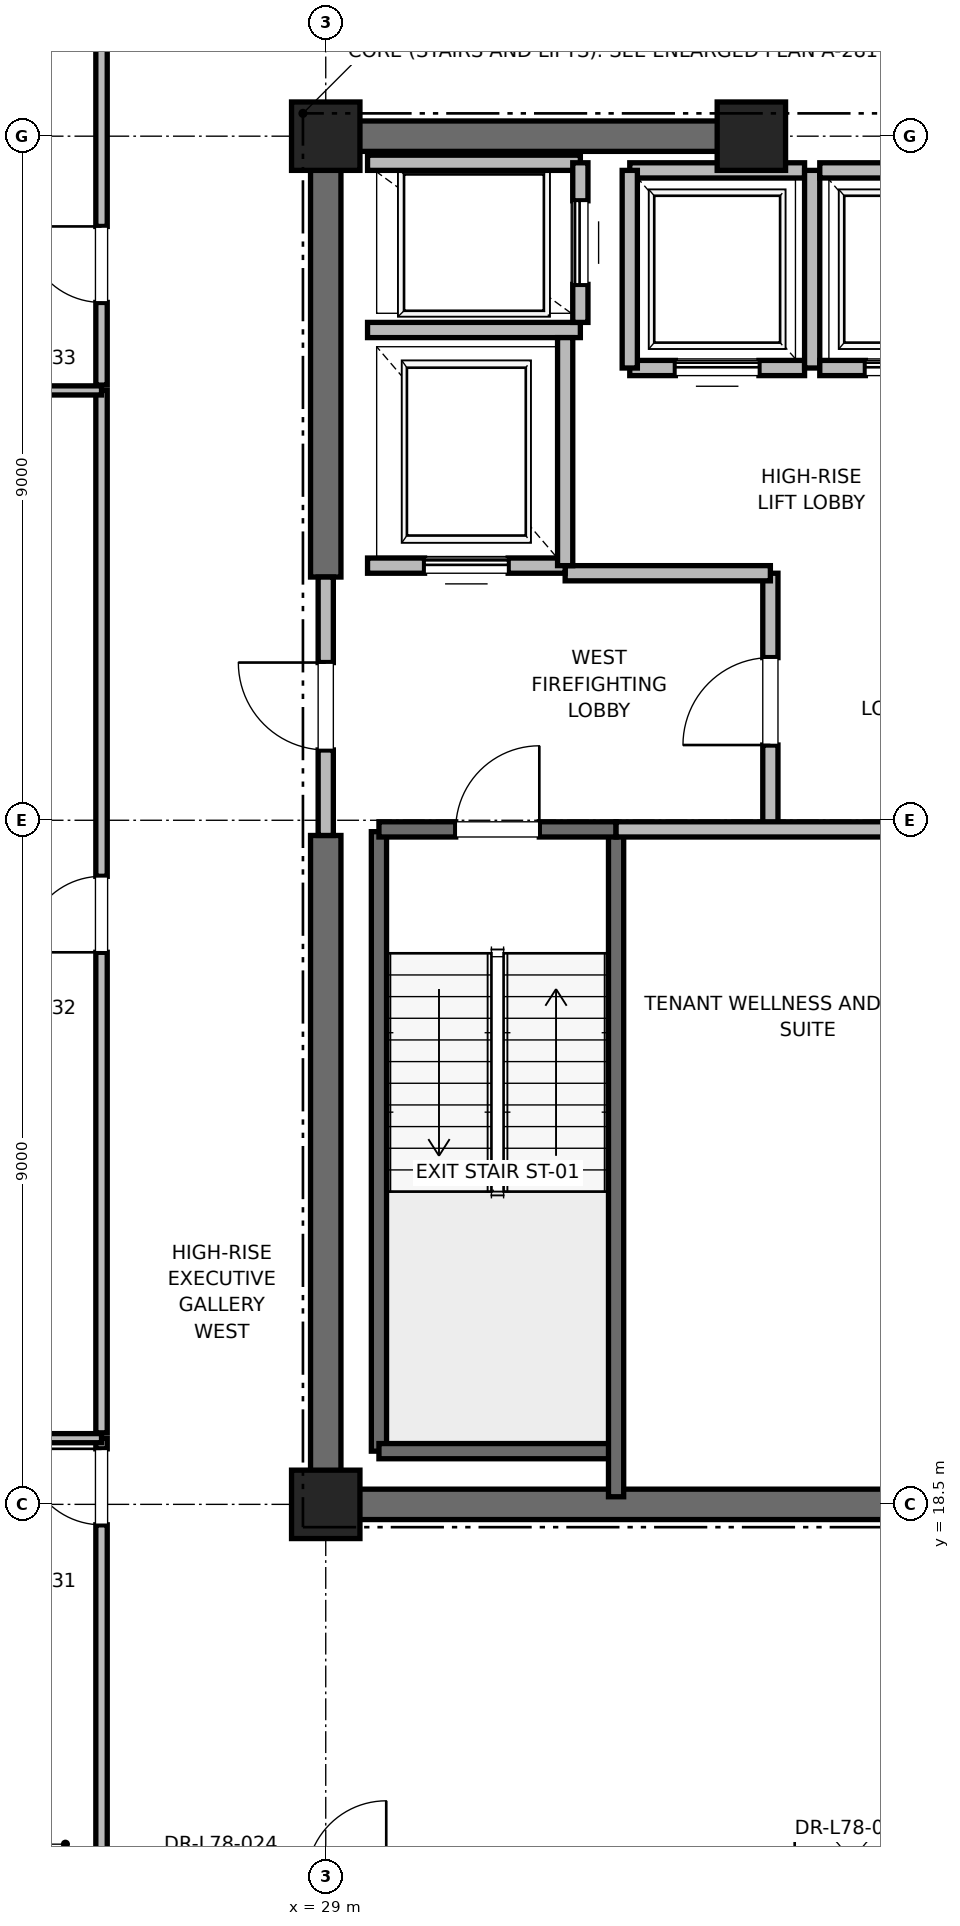
"""IFC4 building model, lengths in metres.
Left out: names, types, materials, properties, quantities, classifications, styles, units other than length and angle.
Written with IfcOpenShell. Run it as: python <this file> out.ifc"""

import sys

from ifc_helpers import new_model, si_unit, direction, frame, frame_2d, origin, origin_2d, place, context, subcontext, project, spatial, rectangle, extrude, element, fill, save


model = new_model("IFC4")
c1 = context("Model", 3, precision=1e-05, world=origin(), true_north=direction((0.0, 1.0)))
c2 = subcontext(c1, "Body", "Model", "MODEL_VIEW")
j1 = project(units=[si_unit("LENGTHUNIT", "METRE"), si_unit("PLANEANGLEUNIT", "RADIAN")], contexts=[c1])
p1 = place(None, origin())
s1 = spatial("IfcSite", under=j1, at=p1, CompositionType="ELEMENT")
p2 = place(p1, origin())
s2 = spatial("IfcBuilding", under=s1, at=p2, CompositionType="ELEMENT")
p3 = place(p2, frame((0.0, 0.0, 334.8)))
s3 = spatial("IfcBuildingStorey", under=s2, at=p3, CompositionType="ELEMENT", Elevation=334.8)
for number, where, z_axis, x_axis in (
    (1, (29.0, 18.5, 0.0), (0.0, 0.0, 1.0), (1.0, 0.0, 0.0)),
    (2, (29.0, 36.5, 0.0), (0.0, 0.0, 1.0), (1.0, 0.0, 0.0)),
    (3, (34.6, 36.5, 0.0), (0.0, 0.0, 1.0), (1.0, 0.0, 0.0)),
):
    element("IfcColumn", number, at=place(p3, frame(where, z_axis=z_axis, x_axis=x_axis)), inside=s3, PredefinedType="PILASTER", context=c2, shape_type="SweptSolid", body=[
        extrude(rectangle(XDim=0.9, YDim=0.9, at=origin_2d()), origin(), (0.0, 0.0, 1.0), 4.0),
    ])
p4 = place(p3, frame((29.0, 18.5, 0.0), z_axis=(0.0, 0.0, 1.0), x_axis=(1.0, 0.0, 0.0)))
e4 = element("IfcWall", 4, at=p4, inside=s3, PredefinedType="SHEAR", context=c2, shape_type="SweptSolid", body=[
    extrude(rectangle(XDim=9.2, YDim=0.4, at=frame_2d((4.6, 0.0))), origin(), (0.0, 0.0, 1.0), 3.785),
])
p5 = place(p3, frame((29.0, 36.5, 0.0), z_axis=(0.0, 0.0, 1.0), x_axis=(1.0, 0.0, 0.0)))
e5 = element("IfcWall", 5, at=p5, inside=s3, PredefinedType="SHEAR", context=c2, shape_type="SweptSolid", body=[
    extrude(rectangle(XDim=5.8, YDim=0.4, at=frame_2d((2.9, 0.0))), origin(), (0.0, 0.0, 1.0), 3.785),
])
p6 = place(p3, frame((29.0, 18.5, 0.0), z_axis=(0.0, 0.0, 1.0), x_axis=(0.0, 1.0, 0.0)))
e6 = element("IfcWall", 6, at=p6, inside=s3, PredefinedType="SHEAR", context=c2, shape_type="SweptSolid", body=[
    extrude(rectangle(XDim=8.8, YDim=0.4, at=frame_2d((4.4, 0.0))), origin(), (0.0, 0.0, 1.0), 3.785),
])
p7 = place(p3, frame((29.0, 30.7, 0.0), z_axis=(0.0, 0.0, 1.0), x_axis=(0.0, 1.0, 0.0)))
e7 = element("IfcWall", 7, at=p7, inside=s3, PredefinedType="SHEAR", context=c2, shape_type="SweptSolid", body=[
    extrude(rectangle(XDim=5.8, YDim=0.4, at=frame_2d((2.9, 0.0))), origin(), (0.0, 0.0, 1.0), 3.785),
])
p8 = place(p3, frame((29.7, 19.2, 0.0), z_axis=(0.0, 0.0, 1.0), x_axis=(0.0, 1.0, 0.0)))
e8 = element("IfcWall", 8, at=p8, inside=s3, PredefinedType="SOLIDWALL", context=c2, shape_type="SweptSolid", body=[
    extrude(rectangle(XDim=8.15, YDim=0.2, at=frame_2d((4.075, 0.0))), origin(), (0.0, 0.0, 1.0), 3.785),
])
p9 = place(p3, frame((29.7, 19.2, 0.0), z_axis=(0.0, 0.0, 1.0), x_axis=(1.0, 0.0, 0.0)))
e9 = element("IfcWall", 9, at=p9, inside=s3, PredefinedType="SOLIDWALL", context=c2, shape_type="SweptSolid", body=[
    extrude(rectangle(XDim=3.12, YDim=0.2, at=frame_2d((1.56, 0.0))), origin(), (0.0, 0.0, 1.0), 3.785),
])
p10 = place(p3, frame((32.82, 18.6, 0.0), z_axis=(0.0, 0.0, 1.0), x_axis=(0.0, 1.0, 0.0)))
e10 = element("IfcWall", 10, at=p10, inside=s3, PredefinedType="SOLIDWALL", context=c2, shape_type="SweptSolid", body=[
    extrude(rectangle(XDim=8.78, YDim=0.2, at=frame_2d((4.39, 0.0))), origin(), (0.0, 0.0, 1.0), 3.785),
])
p11 = place(p3, frame((29.7, 27.38, 0.0), z_axis=(0.0, 0.0, 1.0), x_axis=(1.0, 0.0, 0.0)))
e11 = element("IfcWall", 11, at=p11, inside=s3, PredefinedType="SOLIDWALL", context=c2, shape_type="SweptSolid", body=[
    extrude(rectangle(XDim=3.12, YDim=0.2, at=frame_2d((1.56, 0.0))), origin(), (0.0, 0.0, 1.0), 3.785),
])
p12 = place(p11, frame((1.01, 0.0, 0.0)))
e12 = element("IfcOpeningElement", 12, at=p12, cuts=e11, PredefinedType="OPENING", context=c2, shape_type="SweptSolid", body=[
    extrude(rectangle(XDim=1.1, YDim=2.15, at=frame_2d((0.55, 1.075))), frame((0.0, 0.1, 0.0), z_axis=(0.0, -1.0, 0.0), x_axis=(1.0, 0.0, 0.0)), (0.0, 0.0, 1.0), 0.2),
])
p13 = place(p3, frame((34.85, 27.38, 0.0), z_axis=(0.0, 0.0, 1.0), x_axis=(0.0, 1.0, 0.0)))
e13 = element("IfcWall", 13, at=p13, inside=s3, PredefinedType="PARTITIONING", context=c2, shape_type="SweptSolid", body=[
    extrude(rectangle(XDim=3.37, YDim=0.2, at=frame_2d((1.685, 0.0))), origin(), (0.0, 0.0, 1.0), 3.785),
])
p14 = place(p13, frame((1.11, 0.0, 0.0)))
e14 = element("IfcOpeningElement", 14, at=p14, cuts=e13, PredefinedType="OPENING", context=c2, shape_type="SweptSolid", body=[
    extrude(rectangle(XDim=1.15, YDim=2.2, at=frame_2d((0.575, 1.1))), frame((0.0, 0.1, 0.0), z_axis=(0.0, -1.0, 0.0), x_axis=(1.0, 0.0, 0.0)), (0.0, 0.0, 1.0), 0.2),
])
p15 = place(p3, frame((29.0, 27.3, 0.0), z_axis=(0.0, 0.0, 1.0), x_axis=(0.0, 1.0, 0.0)))
e15 = element("IfcWall", 15, at=p15, inside=s3, PredefinedType="PARTITIONING", context=c2, shape_type="SweptSolid", body=[
    extrude(rectangle(XDim=3.4, YDim=0.2, at=frame_2d((1.7, 0.0))), origin(), (0.0, 0.0, 1.0), 2.865),
])
p16 = place(p15, frame((1.125, 0.0, 0.0)))
e16 = element("IfcOpeningElement", 16, at=p16, cuts=e15, PredefinedType="OPENING", context=c2, shape_type="SweptSolid", body=[
    extrude(rectangle(XDim=1.15, YDim=2.2, at=frame_2d((0.575, 1.1))), frame((0.0, 0.1, 0.0), z_axis=(0.0, -1.0, 0.0), x_axis=(1.0, 0.0, 0.0)), (0.0, 0.0, 1.0), 0.2),
])
p17 = place(p3, frame((32.82, 27.38, 0.0), z_axis=(0.0, 0.0, 1.0), x_axis=(1.0, 0.0, 0.0)))
e17 = element("IfcWall", 17, at=p17, inside=s3, PredefinedType="PARTITIONING", context=c2, shape_type="SweptSolid", body=[
    extrude(rectangle(XDim=5.62, YDim=0.2, at=frame_2d((2.81, 0.0))), origin(), (0.0, 0.0, 1.0), 3.785),
])
p18 = place(p3, frame((32.15, 30.75, 0.0), z_axis=(0.0, 0.0, 1.0), x_axis=(1.0, 0.0, 0.0)))
e18 = element("IfcWall", 18, at=p18, inside=s3, PredefinedType="PARTITIONING", context=c2, shape_type="SweptSolid", body=[
    extrude(rectangle(XDim=2.7, YDim=0.2, at=frame_2d((1.35, 0.0))), origin(), (0.0, 0.0, 1.0), 3.785),
])
p19 = place(p3, frame((29.55, 30.85, 0.0), z_axis=(0.0, 0.0, 1.0), x_axis=(1.0, 0.0, 0.0)))
e19 = element("IfcWall", 19, at=p19, inside=s3, PredefinedType="SOLIDWALL", context=c2, shape_type="SweptSolid", body=[
    extrude(rectangle(XDim=2.6, YDim=0.2, at=frame_2d((1.3, 0.0))), origin(), (0.0, 0.0, 1.0), 2.865),
])
p20 = place(p19, frame((0.75, 0.0, 0.0)))
e20 = element("IfcOpeningElement", 20, at=p20, cuts=e19, PredefinedType="OPENING", context=c2, shape_type="SweptSolid", body=[
    extrude(rectangle(XDim=1.1, YDim=2.2, at=frame_2d((0.55, 1.1))), frame((0.0, 0.1, 0.0), z_axis=(0.0, -1.0, 0.0), x_axis=(1.0, 0.0, 0.0)), (0.0, 0.0, 1.0), 0.2),
])
p21 = place(p3, frame((29.55, 33.95, 0.0), z_axis=(0.0, 0.0, 1.0), x_axis=(1.0, 0.0, 0.0)))
e21 = element("IfcWall", 21, at=p21, inside=s3, PredefinedType="SOLIDWALL", context=c2, shape_type="SweptSolid", body=[
    extrude(rectangle(XDim=2.8, YDim=0.2, at=frame_2d((1.4, 0.0))), origin(), (0.0, 0.0, 1.0), 3.785),
])
p22 = place(p3, frame((32.15, 30.85, 0.0), z_axis=(0.0, 0.0, 1.0), x_axis=(0.0, 1.0, 0.0)))
e22 = element("IfcWall", 22, at=p22, inside=s3, PredefinedType="SOLIDWALL", context=c2, shape_type="SweptSolid", body=[
    extrude(rectangle(XDim=3.0, YDim=0.2, at=frame_2d((1.5, 0.0))), origin(), (0.0, 0.0, 1.0), 3.785),
])
p23 = place(p3, frame((32.35, 36.15, 0.0), z_axis=(0.0, 0.0, 1.0), x_axis=(-1.0, 0.0, 0.0)))
e23 = element("IfcWall", 23, at=p23, inside=s3, PredefinedType="SOLIDWALL", context=c2, shape_type="SweptSolid", body=[
    extrude(rectangle(XDim=2.8, YDim=0.2, at=frame_2d((1.4, 0.0))), origin(), (0.0, 0.0, 1.0), 3.22),
])
p24 = place(p3, frame((32.35, 34.05, 0.0), z_axis=(0.0, 0.0, 1.0), x_axis=(0.0, 1.0, 0.0)))
e24 = element("IfcWall", 24, at=p24, inside=s3, PredefinedType="SOLIDWALL", context=c2, shape_type="SweptSolid", body=[
    extrude(rectangle(XDim=2.1, YDim=0.2, at=frame_2d((1.05, 0.0))), origin(), (0.0, 0.0, 1.0), 3.785),
])
p25 = place(p24, frame((0.5, 0.0, 0.0)))
e25 = element("IfcOpeningElement", 25, at=p25, cuts=e24, PredefinedType="OPENING", context=c2, shape_type="SweptSolid", body=[
    extrude(rectangle(XDim=1.1, YDim=2.2, at=frame_2d((0.55, 1.1))), frame((0.0, 0.1, 0.0), z_axis=(0.0, -1.0, 0.0), x_axis=(1.0, 0.0, 0.0)), (0.0, 0.0, 1.0), 0.2),
])
p26 = place(p3, frame((33.0, 33.45, 0.0), z_axis=(0.0, 0.0, 1.0), x_axis=(1.0, 0.0, 0.0)))
e26 = element("IfcWall", 26, at=p26, inside=s3, PredefinedType="SOLIDWALL", context=c2, shape_type="SweptSolid", body=[
    extrude(rectangle(XDim=2.3, YDim=0.2, at=frame_2d((1.15, 0.0))), origin(), (0.0, 0.0, 1.0), 3.785),
])
p27 = place(p26, frame((0.6, 0.0, 0.0)))
e27 = element("IfcOpeningElement", 27, at=p27, cuts=e26, PredefinedType="OPENING", context=c2, shape_type="SweptSolid", body=[
    extrude(rectangle(XDim=1.1, YDim=2.2, at=frame_2d((0.55, 1.1))), frame((0.0, 0.1, 0.0), z_axis=(0.0, -1.0, 0.0), x_axis=(1.0, 0.0, 0.0)), (0.0, 0.0, 1.0), 0.2),
])
p28 = place(p3, frame((35.3, 36.05, 0.0), z_axis=(0.0, 0.0, 1.0), x_axis=(-1.0, 0.0, 0.0)))
e28 = element("IfcWall", 28, at=p28, inside=s3, PredefinedType="SOLIDWALL", context=c2, shape_type="SweptSolid", body=[
    extrude(rectangle(XDim=2.3, YDim=0.2, at=frame_2d((1.15, 0.0))), origin(), (0.0, 0.0, 1.0), 2.865),
])
p29 = place(p3, frame((33.0, 36.05, 0.0), z_axis=(0.0, 0.0, 1.0), x_axis=(0.0, -1.0, 0.0)))
e29 = element("IfcWall", 29, at=p29, inside=s3, PredefinedType="SOLIDWALL", context=c2, shape_type="SweptSolid", body=[
    extrude(rectangle(XDim=2.6, YDim=0.2, at=frame_2d((1.3, 0.0))), origin(), (0.0, 0.0, 1.0), 3.785),
])
p30 = place(p3, frame((35.4, 33.45, 0.0), z_axis=(0.0, 0.0, 1.0), x_axis=(0.0, 1.0, 0.0)))
e30 = element("IfcWall", 30, at=p30, inside=s3, PredefinedType="SOLIDWALL", context=c2, shape_type="SweptSolid", body=[
    extrude(rectangle(XDim=2.6, YDim=0.2, at=frame_2d((1.3, 0.0))), origin(), (0.0, 0.0, 1.0), 2.865),
])
p31 = place(p3, frame((35.5, 33.45, 0.0), z_axis=(0.0, 0.0, 1.0), x_axis=(1.0, 0.0, 0.0)))
e31 = element("IfcWall", 31, at=p31, inside=s3, PredefinedType="SOLIDWALL", context=c2, shape_type="SweptSolid", body=[
    extrude(rectangle(XDim=2.3, YDim=0.2, at=frame_2d((1.15, 0.0))), origin(), (0.0, 0.0, 1.0), 3.785),
])
p32 = place(p31, frame((0.6, 0.0, 0.0)))
e32 = element("IfcOpeningElement", 32, at=p32, cuts=e31, PredefinedType="OPENING", context=c2, shape_type="SweptSolid", body=[
    extrude(rectangle(XDim=1.1, YDim=2.2, at=frame_2d((0.55, 1.1))), frame((0.0, 0.1, 0.0), z_axis=(0.0, -1.0, 0.0), x_axis=(1.0, 0.0, 0.0)), (0.0, 0.0, 1.0), 0.2),
])
p33 = place(p3, frame((37.8, 36.05, 0.0), z_axis=(0.0, 0.0, 1.0), x_axis=(-1.0, 0.0, 0.0)))
e33 = element("IfcWall", 33, at=p33, inside=s3, PredefinedType="SOLIDWALL", context=c2, shape_type="SweptSolid", body=[
    extrude(rectangle(XDim=2.3, YDim=0.2, at=frame_2d((1.15, 0.0))), origin(), (0.0, 0.0, 1.0), 2.865),
])
p34 = place(p3, frame((26.05, 9.828, 0.0), z_axis=(0.0, 0.0, 1.0), x_axis=(0.0, 1.0, 0.0)))
e34 = element("IfcWall", 34, at=p34, inside=s3, PredefinedType="PARTITIONING", context=c2, shape_type="SweptSolid", body=[
    extrude(rectangle(XDim=9.543, YDim=0.15, at=frame_2d((4.771, 0.0))), origin(), (0.0, 0.0, 1.0), 2.85),
])
p35 = place(p34, frame((8.403, 0.0, 0.0)))
e35 = element("IfcOpeningElement", 35, at=p35, cuts=e34, PredefinedType="OPENING", context=c2, shape_type="SweptSolid", body=[
    extrude(rectangle(XDim=1.0, YDim=2.15, at=frame_2d((0.5, 1.075))), frame((0.0, 0.075, 0.0), z_axis=(0.0, -1.0, 0.0), x_axis=(1.0, 0.0, 0.0)), (0.0, 0.0, 1.0), 0.15),
])
p36 = place(p3, frame((15.756, 19.371, 0.0), z_axis=(0.0, 0.0, 1.0), x_axis=(1.0, 0.0, 0.0)))
e36 = element("IfcWall", 36, at=p36, inside=s3, PredefinedType="PARTITIONING", context=c2, shape_type="SweptSolid", body=[
    extrude(rectangle(XDim=10.294, YDim=0.12, at=frame_2d((5.147, 0.0))), origin(), (0.0, 0.0, 1.0), 2.85),
])
p37 = place(p3, frame((26.05, 19.441, 0.0), z_axis=(0.0, 0.0, 1.0), x_axis=(0.0, 1.0, 0.0)))
e37 = element("IfcWall", 37, at=p37, inside=s3, PredefinedType="PARTITIONING", context=c2, shape_type="SweptSolid", body=[
    extrude(rectangle(XDim=13.714, YDim=0.15, at=frame_2d((6.857, 0.0))), origin(), (0.0, 0.0, 1.0), 2.85),
])
p38 = place(p37, frame((6.322, 0.0, 0.0)))
e38 = element("IfcOpeningElement", 38, at=p38, cuts=e37, PredefinedType="OPENING", context=c2, shape_type="SweptSolid", body=[
    extrude(rectangle(XDim=1.0, YDim=2.15, at=frame_2d((0.5, 1.075))), frame((0.0, 0.075, 0.0), z_axis=(0.0, -1.0, 0.0), x_axis=(1.0, 0.0, 0.0)), (0.0, 0.0, 1.0), 0.15),
])
p39 = place(p3, frame((15.756, 33.155, 0.0), z_axis=(0.0, 0.0, 1.0), x_axis=(1.0, 0.0, 0.0)))
e39 = element("IfcWall", 39, at=p39, inside=s3, PredefinedType="PARTITIONING", context=c2, shape_type="SweptSolid", body=[
    extrude(rectangle(XDim=10.294, YDim=0.12, at=frame_2d((5.147, 0.0))), origin(), (0.0, 0.0, 1.0), 2.85),
])
p40 = place(p3, frame((26.05, 33.225, 0.0), z_axis=(0.0, 0.0, 1.0), x_axis=(0.0, 1.0, 0.0)))
e40 = element("IfcWall", 40, at=p40, inside=s3, PredefinedType="PARTITIONING", context=c2, shape_type="SweptSolid", body=[
    extrude(rectangle(XDim=11.947, YDim=0.15, at=frame_2d((5.974, 0.0))), origin(), (0.0, 0.0, 1.0), 2.85),
])
p41 = place(p40, frame((1.087, 0.0, 0.0)))
e41 = element("IfcOpeningElement", 41, at=p41, cuts=e40, PredefinedType="OPENING", context=c2, shape_type="SweptSolid", body=[
    extrude(rectangle(XDim=1.0, YDim=2.15, at=frame_2d((0.5, 1.075))), frame((0.0, 0.075, 0.0), z_axis=(0.0, -1.0, 0.0), x_axis=(1.0, 0.0, 0.0)), (0.0, 0.0, 1.0), 0.15),
])
p42 = place(p12, origin())
e42 = element("IfcDoor", 42, at=p42, inside=s3, OperationType="SINGLE_SWING_RIGHT", PredefinedType="DOOR", context=c2, shape_type="SweptSolid", body=[
    extrude(rectangle(XDim=1.1, YDim=2.15, at=frame_2d((0.55, 1.075))), frame((0.0, 0.025, 0.0), z_axis=(0.0, -1.0, 0.0), x_axis=(1.0, 0.0, 0.0)), (0.0, 0.0, 1.0), 0.05),
])
fill(e12, e42)
p43 = place(p14, origin())
e43 = element("IfcDoor", 43, at=p43, inside=s3, OperationType="SINGLE_SWING_LEFT", PredefinedType="DOOR", context=c2, shape_type="SweptSolid", body=[
    extrude(rectangle(XDim=1.15, YDim=2.2, at=frame_2d((0.575, 1.1))), frame((0.0, 0.025, 0.0), z_axis=(0.0, -1.0, 0.0), x_axis=(1.0, 0.0, 0.0)), (0.0, 0.0, 1.0), 0.05),
])
fill(e14, e43)
p44 = place(p16, origin())
e44 = element("IfcDoor", 44, at=p44, inside=s3, OperationType="SINGLE_SWING_RIGHT", PredefinedType="DOOR", context=c2, shape_type="SweptSolid", body=[
    extrude(rectangle(XDim=1.15, YDim=2.2, at=frame_2d((0.575, 1.1))), frame((0.0, 0.025, 0.0), z_axis=(0.0, -1.0, 0.0), x_axis=(1.0, 0.0, 0.0)), (0.0, 0.0, 1.0), 0.05),
])
fill(e16, e44)
p45 = place(p20, origin())
e45 = element("IfcDoor", 45, at=p45, inside=s3, OperationType="SLIDING_TO_RIGHT", PredefinedType="DOOR", context=c2, shape_type="SweptSolid", body=[
    extrude(rectangle(XDim=1.1, YDim=2.2, at=frame_2d((0.55, 1.1))), frame((0.0, 0.025, 0.0), z_axis=(0.0, -1.0, 0.0), x_axis=(1.0, 0.0, 0.0)), (0.0, 0.0, 1.0), 0.05),
])
fill(e20, e45)
p46 = place(p25, origin())
e46 = element("IfcDoor", 46, at=p46, inside=s3, OperationType="SLIDING_TO_RIGHT", PredefinedType="DOOR", context=c2, shape_type="SweptSolid", body=[
    extrude(rectangle(XDim=1.1, YDim=2.2, at=frame_2d((0.55, 1.1))), frame((0.0, 0.025, 0.0), z_axis=(0.0, -1.0, 0.0), x_axis=(1.0, 0.0, 0.0)), (0.0, 0.0, 1.0), 0.05),
])
fill(e25, e46)
p47 = place(p27, origin())
e47 = element("IfcDoor", 47, at=p47, inside=s3, OperationType="SLIDING_TO_RIGHT", PredefinedType="DOOR", context=c2, shape_type="SweptSolid", body=[
    extrude(rectangle(XDim=1.1, YDim=2.2, at=frame_2d((0.55, 1.1))), frame((0.0, 0.025, 0.0), z_axis=(0.0, -1.0, 0.0), x_axis=(1.0, 0.0, 0.0)), (0.0, 0.0, 1.0), 0.05),
])
fill(e27, e47)
p48 = place(p32, origin())
e48 = element("IfcDoor", 48, at=p48, inside=s3, OperationType="SLIDING_TO_RIGHT", PredefinedType="DOOR", context=c2, shape_type="SweptSolid", body=[
    extrude(rectangle(XDim=1.1, YDim=2.2, at=frame_2d((0.55, 1.1))), frame((0.0, 0.025, 0.0), z_axis=(0.0, -1.0, 0.0), x_axis=(1.0, 0.0, 0.0)), (0.0, 0.0, 1.0), 0.05),
])
fill(e32, e48)
p49 = place(p35, origin())
e49 = element("IfcDoor", 49, at=p49, inside=s3, OperationType="SINGLE_SWING_RIGHT", PredefinedType="DOOR", context=c2, shape_type="SweptSolid", body=[
    extrude(rectangle(XDim=1.0, YDim=2.15, at=frame_2d((0.5, 1.075))), frame((0.0, 0.025, 0.0), z_axis=(0.0, -1.0, 0.0), x_axis=(1.0, 0.0, 0.0)), (0.0, 0.0, 1.0), 0.05),
])
fill(e35, e49)
p50 = place(p38, origin())
e50 = element("IfcDoor", 50, at=p50, inside=s3, OperationType="SINGLE_SWING_LEFT", PredefinedType="DOOR", context=c2, shape_type="SweptSolid", body=[
    extrude(rectangle(XDim=1.0, YDim=2.15, at=frame_2d((0.5, 1.075))), frame((0.0, 0.025, 0.0), z_axis=(0.0, -1.0, 0.0), x_axis=(1.0, 0.0, 0.0)), (0.0, 0.0, 1.0), 0.05),
])
fill(e38, e50)
p51 = place(p41, origin())
e51 = element("IfcDoor", 51, at=p51, inside=s3, OperationType="SINGLE_SWING_RIGHT", PredefinedType="DOOR", context=c2, shape_type="SweptSolid", body=[
    extrude(rectangle(XDim=1.0, YDim=2.15, at=frame_2d((0.5, 1.075))), frame((0.0, 0.025, 0.0), z_axis=(0.0, -1.0, 0.0), x_axis=(1.0, 0.0, 0.0)), (0.0, 0.0, 1.0), 0.05),
])
fill(e41, e51)
save(model, sys.argv[1])
